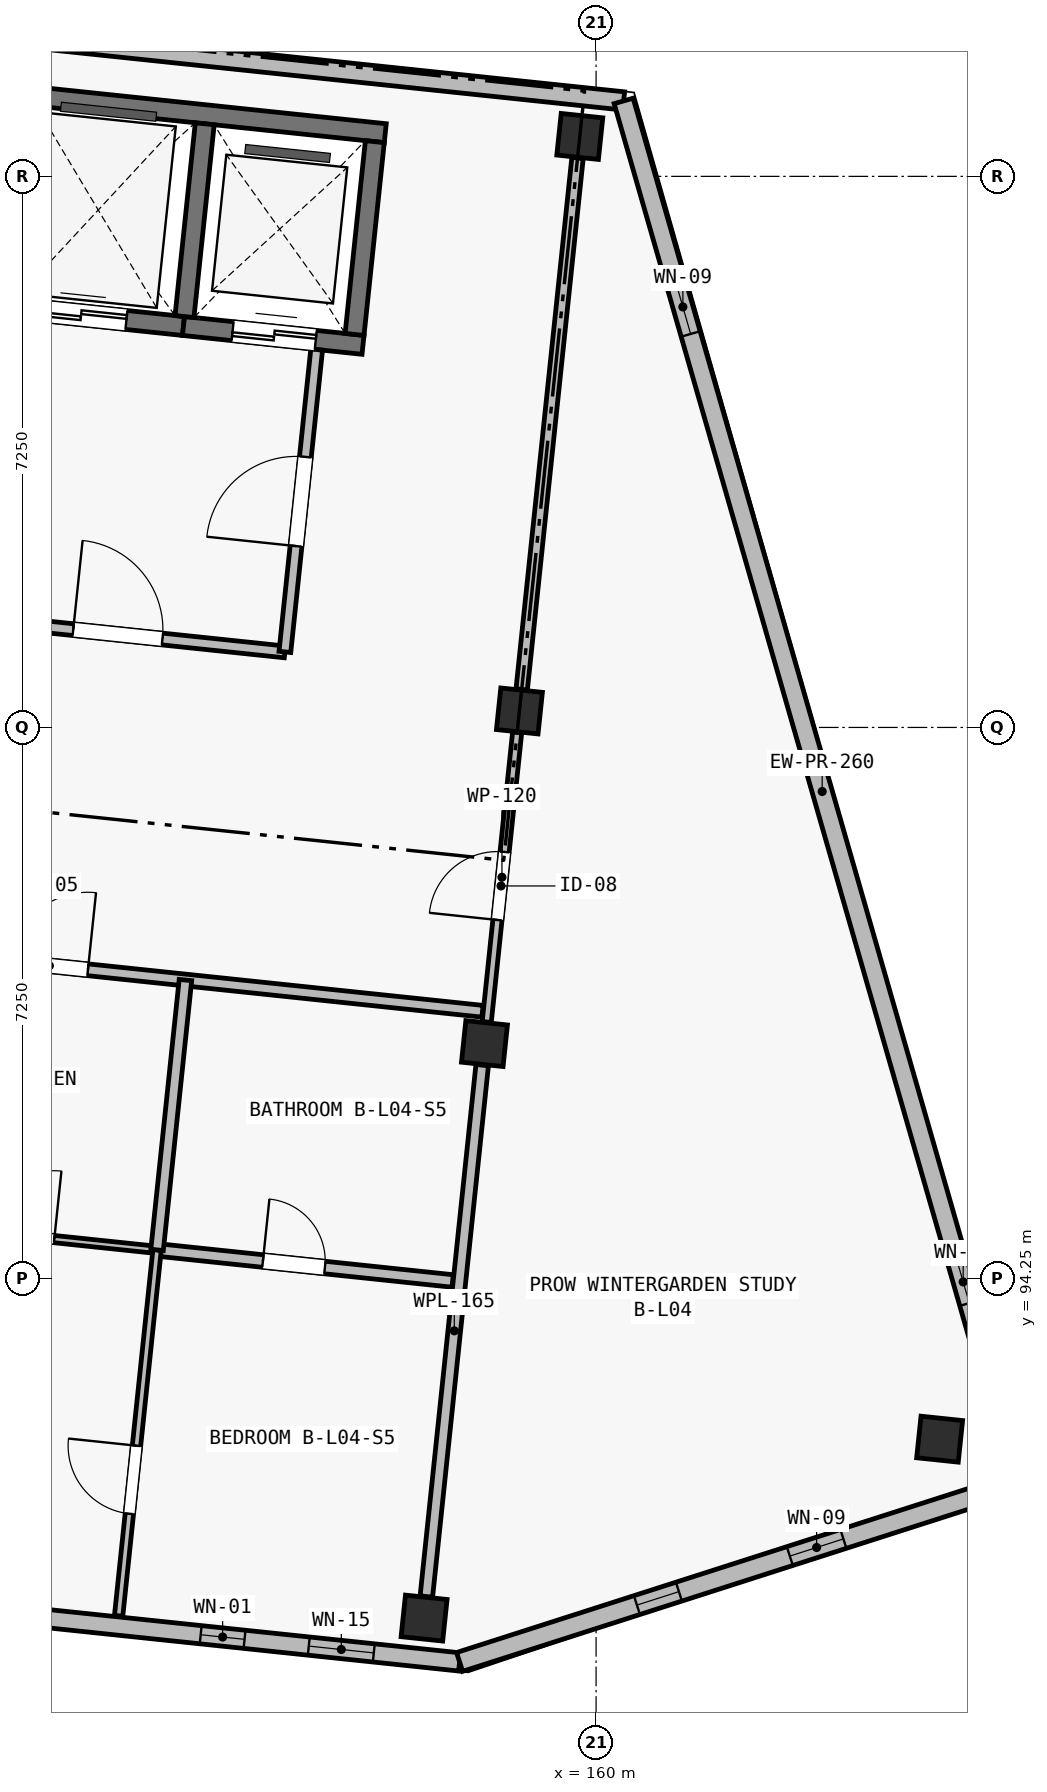
"""IFC4 building model, lengths in metres.
Left out: names, types, materials, properties, quantities, classifications, styles, units other than length and angle.
Written with IfcOpenShell. Run it as: python <this file> out.ifc"""

import sys

from ifc_helpers import new_model, si_unit, direction, frame, frame_2d, origin, origin_2d, place, context, subcontext, project, spatial, rectangle, extrude, element, fill, save


model = new_model("IFC4")
c1 = context("Model", 3, precision=1e-05, world=origin(), true_north=direction((0.0, 1.0)))
c2 = subcontext(c1, "Body", "Model", "MODEL_VIEW")
j1 = project(units=[si_unit("LENGTHUNIT", "METRE"), si_unit("PLANEANGLEUNIT", "RADIAN")], contexts=[c1])
p1 = place(None, origin())
s1 = spatial("IfcSite", under=j1, at=p1, CompositionType="ELEMENT")
p2 = place(p1, origin())
s2 = spatial("IfcBuilding", under=s1, at=p2, CompositionType="ELEMENT")
p3 = place(p2, frame((0.0, 0.0, 14.9)))
s3 = spatial("IfcBuildingStorey", under=s2, at=p3, CompositionType="ELEMENT", Elevation=14.9)
for number, where, z_axis, x_axis in (
    (1, (157.737, 89.783, 0.0), (0.0, 0.0, 1.0), (0.995, -0.105, 0.0)),
    (2, (158.531, 97.341, 0.0), (0.0, 0.0, 1.0), (0.995, -0.105, 0.0)),
    (3, (158.991, 101.717, 0.0), (0.0, 0.0, 1.0), (0.995, -0.105, 0.0)),
    (4, (159.786, 109.275, 0.0), (0.0, 0.0, 1.0), (0.995, -0.105, 0.0)),
    (5, (164.52, 92.136, 0.0), (0.0, 0.0, 1.0), (0.995, -0.105, 0.0)),
):
    element("IfcColumn", number, at=place(p3, frame(where, z_axis=z_axis, x_axis=x_axis)), inside=s3, PredefinedType="COLUMN", context=c2, shape_type="SweptSolid", body=[
        extrude(rectangle(XDim=0.55, YDim=0.55, at=origin_2d()), origin(), (0.0, 0.0, 1.0), 3.25),
    ])
p4 = place(p3, frame((152.204, 109.846, 0.0), z_axis=(0.0, 0.0, 1.0), x_axis=(0.994522922189, -0.104518693261, 0.0)))
e6 = element("IfcWall", 6, at=p4, inside=s3, PredefinedType="SHEAR", context=c2, shape_type="SweptSolid", body=[
    extrude(rectangle(XDim=5.05, YDim=0.25, at=frame_2d((2.525, 0.0))), origin(), (0.0, 0.0, 1.0), 3.25),
])
p5 = place(p3, frame((151.911, 107.061, 0.0), z_axis=(0.0, 0.0, 1.0), x_axis=(0.994524939068, -0.104499500343, 0.0)))
e7 = element("IfcWall", 7, at=p5, inside=s3, PredefinedType="SHEAR", context=c2, shape_type="SweptSolid", body=[
    extrude(rectangle(XDim=2.675, YDim=0.25, at=frame_2d((1.337, 0.0))), origin(), (0.0, 0.0, 1.0), 3.25),
])
p6 = place(p5, frame((0.72, 0.0, 0.0)))
e8 = element("IfcOpeningElement", 8, at=p6, cuts=e7, PredefinedType="OPENING", context=c2, shape_type="SweptSolid", body=[
    extrude(rectangle(XDim=1.2, YDim=2.2, at=frame_2d((0.6, 1.1))), frame((0.0, 0.14, 0.0), z_axis=(0.0, -1.0, 0.0), x_axis=(1.0, 0.0, 0.0)), (0.0, 0.0, 1.0), 0.28),
])
p7 = place(p3, frame((154.572, 106.782, 0.0), z_axis=(0.0, 0.0, 1.0), x_axis=(0.994520650134, -0.1045403102, 0.0)))
e9 = element("IfcWall", 9, at=p7, inside=s3, PredefinedType="SHEAR", context=c2, shape_type="SweptSolid", body=[
    extrude(rectangle(XDim=2.375, YDim=0.25, at=frame_2d((1.188, 0.0))), origin(), (0.0, 0.0, 1.0), 3.25),
])
p8 = place(p7, frame((0.65, 0.0, 0.0)))
e10 = element("IfcOpeningElement", 10, at=p8, cuts=e9, PredefinedType="OPENING", context=c2, shape_type="SweptSolid", body=[
    extrude(rectangle(XDim=1.1, YDim=2.15, at=frame_2d((0.55, 1.075))), frame((0.0, 0.14, 0.0), z_axis=(0.0, -1.0, 0.0), x_axis=(1.0, 0.0, 0.0)), (0.0, 0.0, 1.0), 0.28),
])
p9 = place(p3, frame((154.585, 106.906, 0.0), z_axis=(0.0, 0.0, 1.0), x_axis=(0.104555197931, 0.994519085079, 0.0)))
e11 = element("IfcWall", 11, at=p9, inside=s3, PredefinedType="SHEAR", context=c2, shape_type="SweptSolid", body=[
    extrude(rectangle(XDim=2.55, YDim=0.25, at=frame_2d((1.275, 0.0))), origin(), (0.0, 0.0, 1.0), 3.25),
])
p10 = place(p3, frame((156.822, 106.671, 0.0), z_axis=(0.0, 0.0, 1.0), x_axis=(0.104545242946, 0.99452013161, 0.0)))
e12 = element("IfcWall", 12, at=p10, inside=s3, PredefinedType="SHEAR", context=c2, shape_type="SweptSolid", body=[
    extrude(rectangle(XDim=2.55, YDim=0.25, at=frame_2d((1.275, 0.0))), origin(), (0.0, 0.0, 1.0), 3.25),
])
p11 = place(p3, frame((158.204, 89.206, 0.0), z_axis=(0.0, 0.0, 1.0), x_axis=(-0.994521760736, 0.104529744196, 0.0)))
e13 = element("IfcWall", 13, at=p11, inside=s3, PredefinedType="SOLIDWALL", context=c2, shape_type="SweptSolid", body=[
    extrude(rectangle(XDim=8.525, YDim=0.24, at=frame_2d((4.262, 0.0))), origin(), (0.0, 0.0, 1.0), 3.0),
])
p12 = place(p11, frame((1.135, 0.0, 0.42)))
e14 = element("IfcOpeningElement", 14, at=p12, cuts=e13, PredefinedType="OPENING", context=c2, shape_type="SweptSolid", body=[
    extrude(rectangle(XDim=0.86, YDim=2.36, at=frame_2d((0.43, 1.18))), frame((0.0, 0.135, 0.0), z_axis=(0.0, -1.0, 0.0), x_axis=(1.0, 0.0, 0.0)), (0.0, 0.0, 1.0), 0.27),
])
p13 = place(p11, frame((2.845, 0.0, 0.48)))
e15 = element("IfcOpeningElement", 15, at=p13, cuts=e13, PredefinedType="OPENING", context=c2, shape_type="SweptSolid", body=[
    extrude(rectangle(XDim=0.58, YDim=2.16, at=frame_2d((0.29, 1.08))), frame((0.0, 0.135, 0.0), z_axis=(0.0, -1.0, 0.0), x_axis=(1.0, 0.0, 0.0)), (0.0, 0.0, 1.0), 0.27),
])
p14 = place(p11, frame((6.782, 0.0, 0.42)))
e16 = element("IfcOpeningElement", 16, at=p14, cuts=e13, PredefinedType="OPENING", context=c2, shape_type="SweptSolid", body=[
    extrude(rectangle(XDim=0.62, YDim=2.28, at=frame_2d((0.31, 1.14))), frame((0.0, 0.135, 0.0), z_axis=(0.0, -1.0, 0.0), x_axis=(1.0, 0.0, 0.0)), (0.0, 0.0, 1.0), 0.27),
])
p15 = place(p3, frame((151.885, 110.634, 0.0), z_axis=(0.0, 0.0, 1.0), x_axis=(0.994521760736, -0.104529744196, 0.0)))
e17 = element("IfcWall", 17, at=p15, inside=s3, PredefinedType="SOLIDWALL", context=c2, shape_type="SweptSolid", body=[
    extrude(rectangle(XDim=8.525, YDim=0.24, at=frame_2d((4.262, 0.0))), origin(), (0.0, 0.0, 1.0), 3.0),
])
p16 = place(p3, frame((160.363, 109.742, 0.0), z_axis=(0.0, 0.0, 1.0), x_axis=(0.276322184526, -0.961065060409, 0.0)))
e18 = element("IfcWall", 18, at=p16, inside=s3, PredefinedType="SOLIDWALL", context=c2, shape_type="SweptSolid", body=[
    extrude(rectangle(XDim=18.907, YDim=0.26, at=frame_2d((9.453, 0.0))), origin(), (0.0, 0.0, 1.0), 3.0),
])
p17 = place(p16, frame((2.45, 0.0, 0.45)))
e19 = element("IfcOpeningElement", 19, at=p17, cuts=e18, PredefinedType="OPENING", context=c2, shape_type="SweptSolid", body=[
    extrude(rectangle(XDim=0.74, YDim=2.26, at=frame_2d((0.37, 1.13))), frame((0.0, 0.145, 0.0), z_axis=(0.0, -1.0, 0.0), x_axis=(1.0, 0.0, 0.0)), (0.0, 0.0, 1.0), 0.29),
])
p18 = place(p16, frame((15.877, 0.0, 0.52)))
e20 = element("IfcOpeningElement", 20, at=p18, cuts=e18, PredefinedType="OPENING", context=c2, shape_type="SweptSolid", body=[
    extrude(rectangle(XDim=0.58, YDim=2.16, at=frame_2d((0.29, 1.08))), frame((0.0, 0.145, 0.0), z_axis=(0.0, -1.0, 0.0), x_axis=(1.0, 0.0, 0.0)), (0.0, 0.0, 1.0), 0.29),
])
p19 = place(p3, frame((165.587, 91.572, 0.0), z_axis=(0.0, 0.0, 1.0), x_axis=(-0.9522851043, -0.305209895201, 0.0)))
e21 = element("IfcWall", 21, at=p19, inside=s3, PredefinedType="SOLIDWALL", context=c2, shape_type="SweptSolid", body=[
    extrude(rectangle(XDim=7.753, YDim=0.26, at=frame_2d((3.876, 0.0))), origin(), (0.0, 0.0, 1.0), 3.0),
])
p20 = place(p19, frame((2.45, 0.0, 0.45)))
e22 = element("IfcOpeningElement", 22, at=p20, cuts=e21, PredefinedType="OPENING", context=c2, shape_type="SweptSolid", body=[
    extrude(rectangle(XDim=0.74, YDim=2.26, at=frame_2d((0.37, 1.13))), frame((0.0, 0.145, 0.0), z_axis=(0.0, -1.0, 0.0), x_axis=(1.0, 0.0, 0.0)), (0.0, 0.0, 1.0), 0.29),
])
p21 = place(p19, frame((4.723, 0.0, 0.52)))
e23 = element("IfcOpeningElement", 23, at=p21, cuts=e21, PredefinedType="OPENING", context=c2, shape_type="SweptSolid", body=[
    extrude(rectangle(XDim=0.58, YDim=2.16, at=frame_2d((0.29, 1.08))), frame((0.0, 0.145, 0.0), z_axis=(0.0, -1.0, 0.0), x_axis=(1.0, 0.0, 0.0)), (0.0, 0.0, 1.0), 0.29),
])
p22 = place(p3, frame((151.53, 102.954, 0.0), z_axis=(0.0, 0.0, 1.0), x_axis=(0.994521251134, -0.104534592565, 0.0)))
e24 = element("IfcWall", 24, at=p22, inside=s3, PredefinedType="PARTITIONING", context=c2, shape_type="SweptSolid", body=[
    extrude(rectangle(XDim=4.4, YDim=0.155, at=frame_2d((2.2, 0.0))), origin(), (0.0, 0.0, 1.0), 2.97),
])
p23 = place(p22, frame((1.6, 0.0, 0.0)))
e25 = element("IfcOpeningElement", 25, at=p23, cuts=e24, PredefinedType="OPENING", context=c2, shape_type="SweptSolid", body=[
    extrude(rectangle(XDim=1.18, YDim=2.15, at=frame_2d((0.59, 1.075))), frame((0.0, 0.093, 0.0), z_axis=(0.0, -1.0, 0.0), x_axis=(1.0, 0.0, 0.0)), (0.0, 0.0, 1.0), 0.185),
])
p24 = place(p3, frame((155.906, 102.494, 0.0), z_axis=(0.0, 0.0, 1.0), x_axis=(0.104494148666, 0.99452550138, 0.0)))
e26 = element("IfcWall", 26, at=p24, inside=s3, PredefinedType="PARTITIONING", context=c2, shape_type="SweptSolid", body=[
    extrude(rectangle(XDim=4.0, YDim=0.155, at=frame_2d((2.0, 0.0))), origin(), (0.0, 0.0, 1.0), 2.97),
])
p25 = place(p24, frame((1.4, 0.0, 0.0)))
e27 = element("IfcOpeningElement", 27, at=p25, cuts=e26, PredefinedType="OPENING", context=c2, shape_type="SweptSolid", body=[
    extrude(rectangle(XDim=1.18, YDim=2.15, at=frame_2d((0.59, 1.075))), frame((0.0, 0.093, 0.0), z_axis=(0.0, -1.0, 0.0), x_axis=(1.0, 0.0, 0.0)), (0.0, 0.0, 1.0), 0.185),
])
p26 = place(p3, frame((158.561, 97.625, 0.0), z_axis=(0.0, 0.0, 1.0), x_axis=(0.104545412893, 0.994520113745, 0.0)))
e28 = element("IfcWall", 28, at=p26, inside=s3, PredefinedType="PARTITIONING", context=c2, shape_type="SweptSolid", body=[
    extrude(rectangle(XDim=3.83, YDim=0.12, at=frame_2d((1.915, 0.0))), origin(), (0.0, 0.0, 1.0), 2.5),
])
p27 = place(p26, frame((1.35, 0.0, 0.0)))
e29 = element("IfcOpeningElement", 29, at=p27, cuts=e28, PredefinedType="OPENING", context=c2, shape_type="SweptSolid", body=[
    extrude(rectangle(XDim=0.9, YDim=2.1, at=frame_2d((0.45, 1.05))), frame((0.0, 0.075, 0.0), z_axis=(0.0, -1.0, 0.0), x_axis=(1.0, 0.0, 0.0)), (0.0, 0.0, 1.0), 0.15),
])
p28 = place(p3, frame((159.021, 102.0, 0.0), z_axis=(0.0, 0.0, 1.0), x_axis=(0.10452931889, 0.994521805438, 0.0)))
e30 = element("IfcWall", 30, at=p28, inside=s3, PredefinedType="PARTITIONING", context=c2, shape_type="SweptSolid", body=[
    extrude(rectangle(XDim=7.03, YDim=0.15, at=frame_2d((3.515, 0.0))), origin(), (0.0, 0.0, 1.0), 2.5),
])
p29 = place(p3, frame((157.767, 90.066, 0.0), z_axis=(0.0, 0.0, 1.0), x_axis=(0.104532929154, 0.994521425975, 0.0)))
e31 = element("IfcWall", 31, at=p29, inside=s3, PredefinedType="PLUMBINGWALL", context=c2, shape_type="SweptSolid", body=[
    extrude(rectangle(XDim=7.03, YDim=0.165, at=frame_2d((3.515, 0.0))), origin(), (0.0, 0.0, 1.0), 2.5),
])
p30 = place(p3, frame((150.903, 98.565, 0.0), z_axis=(0.0, 0.0, 1.0), x_axis=(0.994522762445, -0.104520213258, 0.0)))
e32 = element("IfcWall", 32, at=p30, inside=s3, PredefinedType="PARTITIONING", context=c2, shape_type="SweptSolid", body=[
    extrude(rectangle(XDim=7.645, YDim=0.155, at=frame_2d((3.823, 0.0))), origin(), (0.0, 0.0, 1.0), 2.97),
])
p31 = place(p30, frame((1.405, 0.0, 0.0)))
e33 = element("IfcOpeningElement", 33, at=p31, cuts=e32, PredefinedType="OPENING", context=c2, shape_type="SweptSolid", body=[
    extrude(rectangle(XDim=1.02, YDim=2.2, at=frame_2d((0.51, 1.1))), frame((0.0, 0.093, 0.0), z_axis=(0.0, -1.0, 0.0), x_axis=(1.0, 0.0, 0.0)), (0.0, 0.0, 1.0), 0.185),
])
p32 = place(p3, frame((150.36, 95.032, 0.0), z_axis=(0.0, 0.0, 1.0), x_axis=(0.994524375082, -0.104504867671, 0.0)))
e34 = element("IfcWall", 34, at=p32, inside=s3, PredefinedType="PARTITIONING", context=c2, shape_type="SweptSolid", body=[
    extrude(rectangle(XDim=3.885, YDim=0.095, at=frame_2d((1.942, 0.0))), origin(), (0.0, 0.0, 1.0), 2.97),
])
p33 = place(p32, frame((1.625, 0.0, 0.0)))
e35 = element("IfcOpeningElement", 35, at=p33, cuts=e34, PredefinedType="OPENING", context=c2, shape_type="SweptSolid", body=[
    extrude(rectangle(XDim=0.9, YDim=2.1, at=frame_2d((0.45, 1.05))), frame((0.0, 0.062, 0.0), z_axis=(0.0, -1.0, 0.0), x_axis=(1.0, 0.0, 0.0)), (0.0, 0.0, 1.0), 0.125),
])
p34 = place(p3, frame((154.224, 94.626, 0.0), z_axis=(0.0, 0.0, 1.0), x_axis=(0.994522546118, -0.10452227161, 0.0)))
e36 = element("IfcWall", 36, at=p34, inside=s3, PredefinedType="PLUMBINGWALL", context=c2, shape_type="SweptSolid", body=[
    extrude(rectangle(XDim=3.91, YDim=0.165, at=frame_2d((1.955, 0.0))), origin(), (0.0, 0.0, 1.0), 2.97),
])
p35 = place(p34, frame((1.4, 0.0, 0.0)))
e37 = element("IfcOpeningElement", 37, at=p35, cuts=e36, PredefinedType="OPENING", context=c2, shape_type="SweptSolid", body=[
    extrude(rectangle(XDim=0.82, YDim=2.08, at=frame_2d((0.41, 1.04))), frame((0.0, 0.097, 0.0), z_axis=(0.0, -1.0, 0.0), x_axis=(1.0, 0.0, 0.0)), (0.0, 0.0, 1.0), 0.195),
])
p36 = place(p3, frame((153.718, 89.813, 0.0), z_axis=(0.0, 0.0, 1.0), x_axis=(0.104516733692, 0.994523128126, 0.0)))
e38 = element("IfcWall", 38, at=p36, inside=s3, PredefinedType="PARTITIONING", context=c2, shape_type="SweptSolid", body=[
    extrude(rectangle(XDim=4.84, YDim=0.11, at=frame_2d((2.42, 0.0))), origin(), (0.0, 0.0, 1.0), 2.97),
])
p37 = place(p36, frame((1.35, 0.0, 0.0)))
e39 = element("IfcOpeningElement", 39, at=p37, cuts=e38, PredefinedType="OPENING", context=c2, shape_type="SweptSolid", body=[
    extrude(rectangle(XDim=0.9, YDim=2.1, at=frame_2d((0.45, 1.05))), frame((0.0, 0.07, 0.0), z_axis=(0.0, -1.0, 0.0), x_axis=(1.0, 0.0, 0.0)), (0.0, 0.0, 1.0), 0.14),
])
p38 = place(p3, frame((154.224, 94.626, 0.0), z_axis=(0.0, 0.0, 1.0), x_axis=(0.104499661737, 0.994524922109, 0.0)))
e40 = element("IfcWall", 40, at=p38, inside=s3, PredefinedType="PLUMBINGWALL", context=c2, shape_type="SweptSolid", body=[
    extrude(rectangle(XDim=3.57, YDim=0.165, at=frame_2d((1.785, 0.0))), origin(), (0.0, 0.0, 1.0), 2.97),
])
p39 = place(p12, origin())
e41 = element("IfcWindow", 41, at=p39, inside=s3, PartitioningType="SINGLE_PANEL", PredefinedType="WINDOW", context=c2, shape_type="SweptSolid", body=[
    extrude(rectangle(XDim=0.86, YDim=2.36, at=frame_2d((0.43, 1.18))), frame((0.0, 0.03, 0.0), z_axis=(0.0, -1.0, 0.0), x_axis=(1.0, 0.0, 0.0)), (0.0, 0.0, 1.0), 0.06),
])
fill(e14, e41)
p40 = place(p13, origin())
e42 = element("IfcWindow", 42, at=p40, inside=s3, PartitioningType="SINGLE_PANEL", PredefinedType="WINDOW", context=c2, shape_type="SweptSolid", body=[
    extrude(rectangle(XDim=0.58, YDim=2.16, at=frame_2d((0.29, 1.08))), frame((0.0, 0.03, 0.0), z_axis=(0.0, -1.0, 0.0), x_axis=(1.0, 0.0, 0.0)), (0.0, 0.0, 1.0), 0.06),
])
fill(e15, e42)
p41 = place(p17, origin())
e43 = element("IfcWindow", 43, at=p41, inside=s3, PartitioningType="SINGLE_PANEL", PredefinedType="WINDOW", context=c2, shape_type="SweptSolid", body=[
    extrude(rectangle(XDim=0.74, YDim=2.26, at=frame_2d((0.37, 1.13))), frame((0.0, 0.03, 0.0), z_axis=(0.0, -1.0, 0.0), x_axis=(1.0, 0.0, 0.0)), (0.0, 0.0, 1.0), 0.06),
])
fill(e19, e43)
p42 = place(p18, origin())
e44 = element("IfcWindow", 44, at=p42, inside=s3, PartitioningType="SINGLE_PANEL", PredefinedType="WINDOW", context=c2, shape_type="SweptSolid", body=[
    extrude(rectangle(XDim=0.58, YDim=2.16, at=frame_2d((0.29, 1.08))), frame((0.0, 0.03, 0.0), z_axis=(0.0, -1.0, 0.0), x_axis=(1.0, 0.0, 0.0)), (0.0, 0.0, 1.0), 0.06),
])
fill(e20, e44)
p43 = place(p20, origin())
e45 = element("IfcWindow", 45, at=p43, inside=s3, PartitioningType="SINGLE_PANEL", PredefinedType="WINDOW", context=c2, shape_type="SweptSolid", body=[
    extrude(rectangle(XDim=0.74, YDim=2.26, at=frame_2d((0.37, 1.13))), frame((0.0, 0.03, 0.0), z_axis=(0.0, -1.0, 0.0), x_axis=(1.0, 0.0, 0.0)), (0.0, 0.0, 1.0), 0.06),
])
fill(e22, e45)
p44 = place(p21, origin())
e46 = element("IfcWindow", 46, at=p44, inside=s3, PartitioningType="SINGLE_PANEL", PredefinedType="WINDOW", context=c2, shape_type="SweptSolid", body=[
    extrude(rectangle(XDim=0.58, YDim=2.16, at=frame_2d((0.29, 1.08))), frame((0.0, 0.03, 0.0), z_axis=(0.0, -1.0, 0.0), x_axis=(1.0, 0.0, 0.0)), (0.0, 0.0, 1.0), 0.06),
])
fill(e23, e46)
p45 = place(p23, origin())
e47 = element("IfcDoor", 47, at=p45, inside=s3, OperationType="SINGLE_SWING_LEFT", PredefinedType="DOOR", context=c2, shape_type="SweptSolid", body=[
    extrude(rectangle(XDim=1.18, YDim=2.15, at=frame_2d((0.59, 1.075))), frame((0.0, 0.025, 0.0), z_axis=(0.0, -1.0, 0.0), x_axis=(1.0, 0.0, 0.0)), (0.0, 0.0, 1.0), 0.05),
])
fill(e25, e47)
p46 = place(p25, origin())
e48 = element("IfcDoor", 48, at=p46, inside=s3, OperationType="SINGLE_SWING_LEFT", PredefinedType="DOOR", context=c2, shape_type="SweptSolid", body=[
    extrude(rectangle(XDim=1.18, YDim=2.15, at=frame_2d((0.59, 1.075))), frame((0.0, 0.025, 0.0), z_axis=(0.0, -1.0, 0.0), x_axis=(1.0, 0.0, 0.0)), (0.0, 0.0, 1.0), 0.05),
])
fill(e27, e48)
p47 = place(p27, origin())
e49 = element("IfcDoor", 49, at=p47, inside=s3, OperationType="SINGLE_SWING_LEFT", PredefinedType="DOOR", context=c2, shape_type="SweptSolid", body=[
    extrude(rectangle(XDim=0.9, YDim=2.1, at=frame_2d((0.45, 1.05))), frame((0.0, 0.025, 0.0), z_axis=(0.0, -1.0, 0.0), x_axis=(1.0, 0.0, 0.0)), (0.0, 0.0, 1.0), 0.05),
])
fill(e29, e49)
p48 = place(p31, origin())
e50 = element("IfcDoor", 50, at=p48, inside=s3, OperationType="SINGLE_SWING_RIGHT", PredefinedType="DOOR", context=c2, shape_type="SweptSolid", body=[
    extrude(rectangle(XDim=1.02, YDim=2.2, at=frame_2d((0.51, 1.1))), frame((0.0, 0.025, 0.0), z_axis=(0.0, -1.0, 0.0), x_axis=(1.0, 0.0, 0.0)), (0.0, 0.0, 1.0), 0.05),
])
fill(e33, e50)
p49 = place(p33, origin())
e51 = element("IfcDoor", 51, at=p49, inside=s3, OperationType="SINGLE_SWING_RIGHT", PredefinedType="DOOR", context=c2, shape_type="SweptSolid", body=[
    extrude(rectangle(XDim=0.9, YDim=2.1, at=frame_2d((0.45, 1.05))), frame((0.0, 0.025, 0.0), z_axis=(0.0, -1.0, 0.0), x_axis=(1.0, 0.0, 0.0)), (0.0, 0.0, 1.0), 0.05),
])
fill(e35, e51)
p50 = place(p35, origin())
e52 = element("IfcDoor", 52, at=p50, inside=s3, OperationType="SINGLE_SWING_LEFT", PredefinedType="DOOR", context=c2, shape_type="SweptSolid", body=[
    extrude(rectangle(XDim=0.82, YDim=2.08, at=frame_2d((0.41, 1.04))), frame((0.0, 0.025, 0.0), z_axis=(0.0, -1.0, 0.0), x_axis=(1.0, 0.0, 0.0)), (0.0, 0.0, 1.0), 0.05),
])
fill(e37, e52)
p51 = place(p37, origin())
e53 = element("IfcDoor", 53, at=p51, inside=s3, OperationType="SINGLE_SWING_RIGHT", PredefinedType="DOOR", context=c2, shape_type="SweptSolid", body=[
    extrude(rectangle(XDim=0.9, YDim=2.1, at=frame_2d((0.45, 1.05))), frame((0.0, 0.025, 0.0), z_axis=(0.0, -1.0, 0.0), x_axis=(1.0, 0.0, 0.0)), (0.0, 0.0, 1.0), 0.05),
])
fill(e39, e53)
p52 = place(p6, origin())
e54 = element("IfcDoor", 54, at=p52, inside=s3, OperationType="DOUBLE_DOOR_SLIDING", PredefinedType="DOOR", context=c2, shape_type="SweptSolid", body=[
    extrude(rectangle(XDim=1.2, YDim=2.2, at=frame_2d((0.6, 1.1))), frame((0.0, 0.025, 0.0), z_axis=(0.0, -1.0, 0.0), x_axis=(1.0, 0.0, 0.0)), (0.0, 0.0, 1.0), 0.05),
])
fill(e8, e54)
p53 = place(p8, origin())
e55 = element("IfcDoor", 55, at=p53, inside=s3, OperationType="DOUBLE_DOOR_SLIDING", PredefinedType="DOOR", context=c2, shape_type="SweptSolid", body=[
    extrude(rectangle(XDim=1.1, YDim=2.15, at=frame_2d((0.55, 1.075))), frame((0.0, 0.025, 0.0), z_axis=(0.0, -1.0, 0.0), x_axis=(1.0, 0.0, 0.0)), (0.0, 0.0, 1.0), 0.05),
])
fill(e10, e55)
save(model, sys.argv[1])
